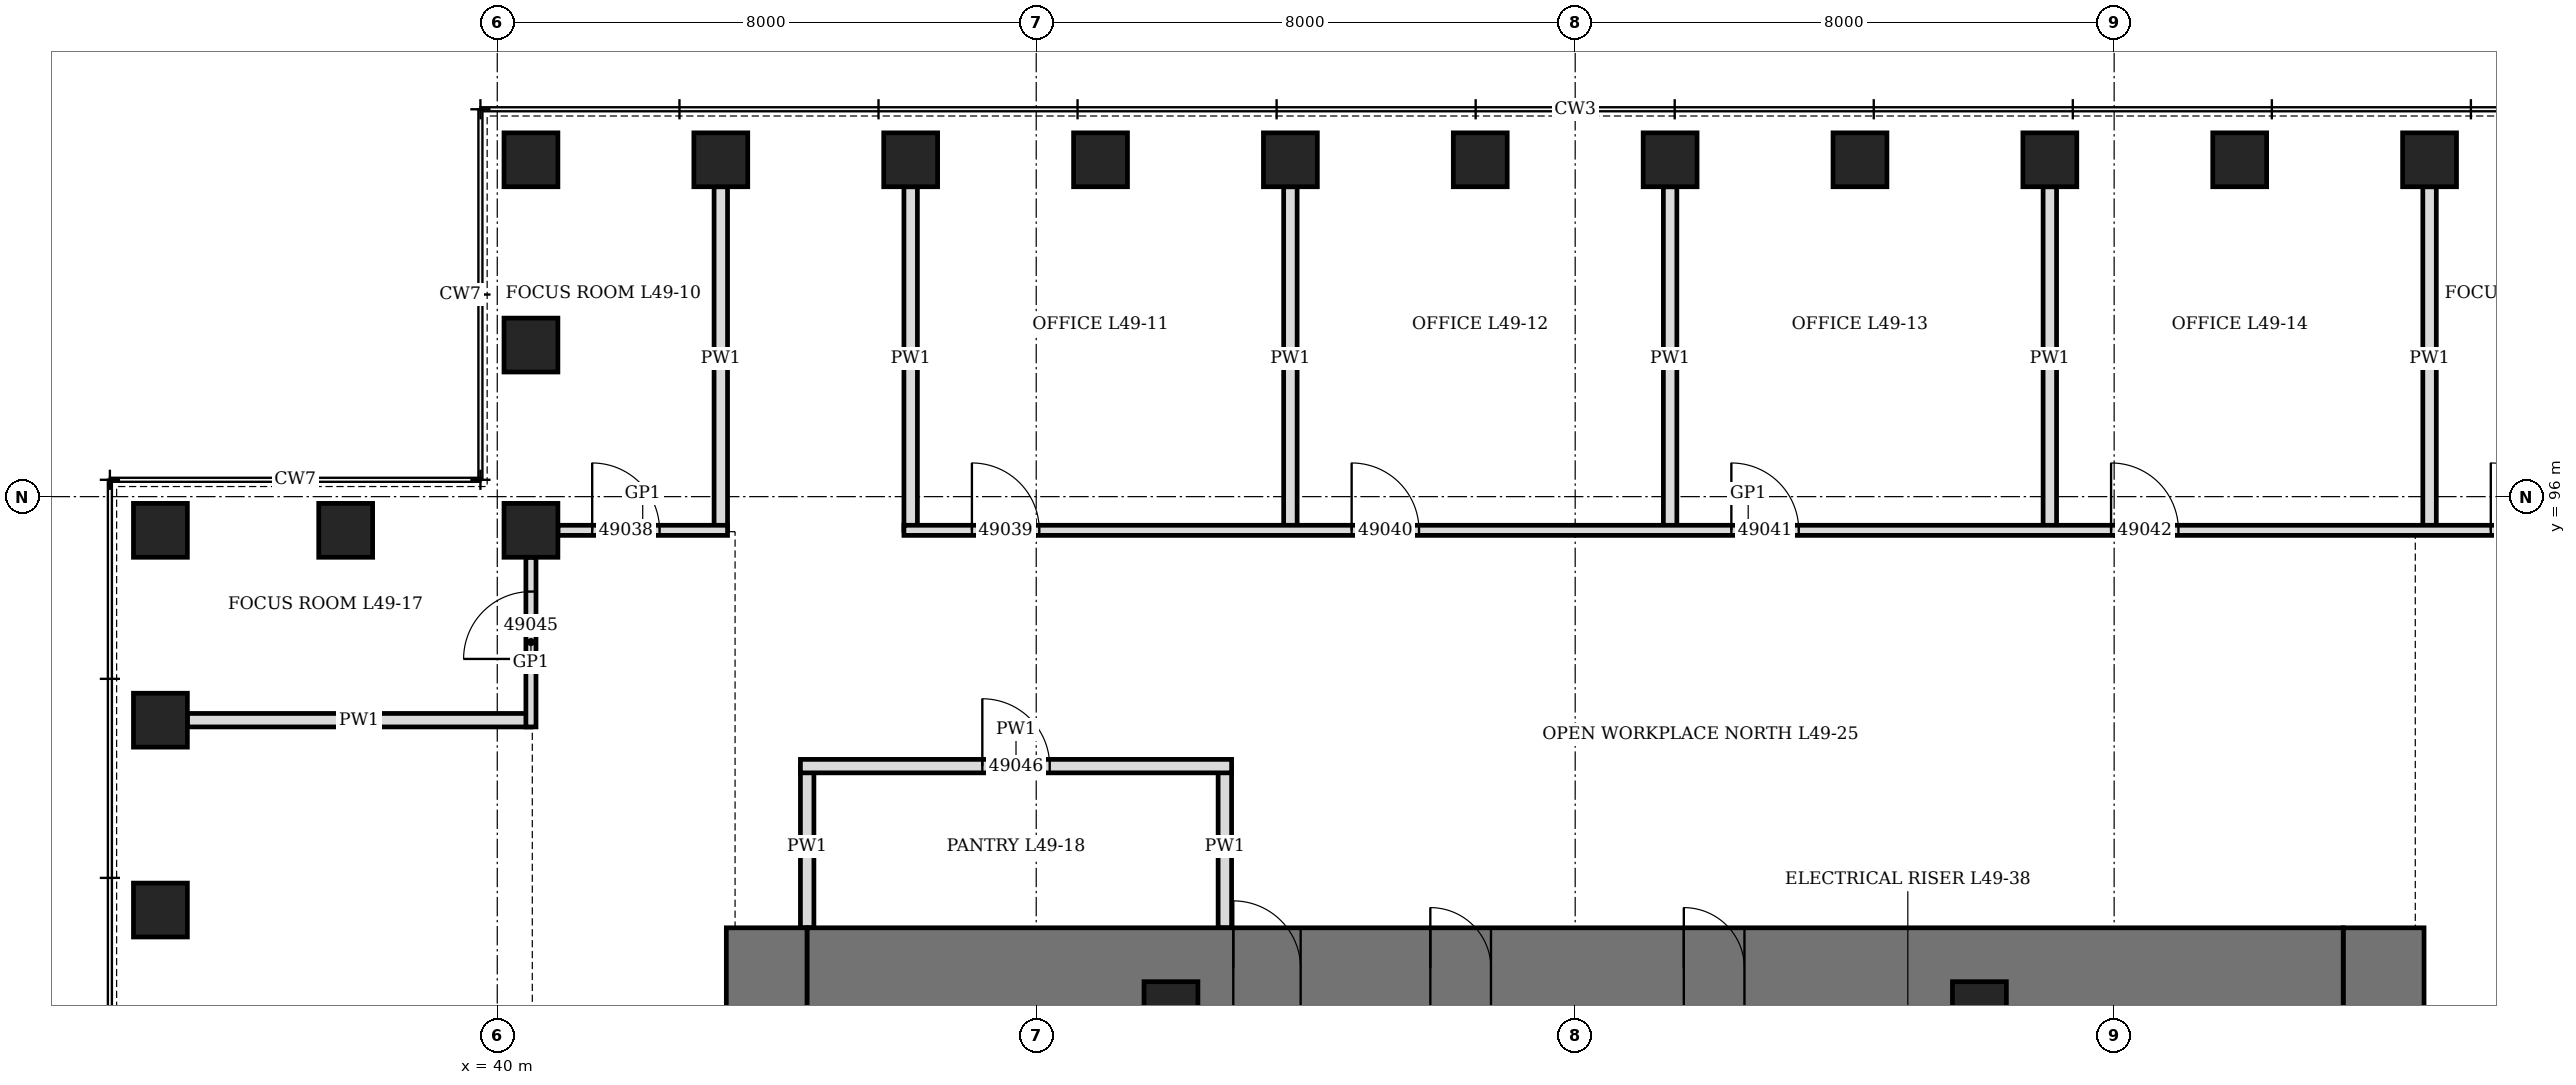
"""IFC4 building model, lengths in metres.
Left out: names, types, materials, properties, quantities, classifications, styles, units other than length and angle.
Written with IfcOpenShell. Run it as: python <this file> out.ifc"""

import sys

from ifc_helpers import new_model, si_unit, direction, frame, frame_2d, origin, origin_2d, place, context, subcontext, project, spatial, rectangle, hollow_rectangle, extrude, element, fill, save


model = new_model("IFC4")
c1 = context("Model", 3, precision=1e-05, world=origin(), true_north=direction((0.0, 1.0)))
c2 = subcontext(c1, "Body", "Model", "MODEL_VIEW")
j1 = project(units=[si_unit("LENGTHUNIT", "METRE"), si_unit("PLANEANGLEUNIT", "RADIAN")], contexts=[c1])
p1 = place(None, origin())
s1 = spatial("IfcSite", under=j1, at=p1, CompositionType="ELEMENT")
p2 = place(p1, origin())
s2 = spatial("IfcBuilding", under=s1, at=p2, CompositionType="ELEMENT")
p3 = place(p2, frame((0.0, 0.0, 219.1)))
s3 = spatial("IfcBuildingStorey", under=s2, at=p3, CompositionType="ELEMENT", Elevation=219.1)
for number, where, z_axis, x_axis in (
    (1, (68.682, 101.0, 0.0), (0.0, 0.0, 1.0), (1.0, 0.0, 0.0)),
    (2, (65.864, 101.0, 0.0), (0.0, 0.0, 1.0), (1.0, 0.0, 0.0)),
    (3, (63.045, 101.0, 0.0), (0.0, 0.0, 1.0), (1.0, 0.0, 0.0)),
    (4, (60.227, 101.0, 0.0), (0.0, 0.0, 1.0), (1.0, 0.0, 0.0)),
    (5, (57.409, 101.0, 0.0), (0.0, 0.0, 1.0), (1.0, 0.0, 0.0)),
    (6, (54.591, 101.0, 0.0), (0.0, 0.0, 1.0), (1.0, 0.0, 0.0)),
    (7, (51.773, 101.0, 0.0), (0.0, 0.0, 1.0), (1.0, 0.0, 0.0)),
    (8, (48.955, 101.0, 0.0), (0.0, 0.0, 1.0), (1.0, 0.0, 0.0)),
    (9, (46.136, 101.0, 0.0), (0.0, 0.0, 1.0), (1.0, 0.0, 0.0)),
    (10, (43.318, 101.0, 0.0), (0.0, 0.0, 1.0), (1.0, 0.0, 0.0)),
    (11, (40.5, 101.0, 0.0), (0.0, 0.0, 1.0), (0.0, 1.0, 0.0)),
    (12, (40.5, 98.25, 0.0), (0.0, 0.0, 1.0), (0.0, 1.0, 0.0)),
    (13, (40.5, 95.5, 0.0), (0.0, 0.0, 1.0), (1.0, 0.0, 0.0)),
    (14, (37.75, 95.5, 0.0), (0.0, 0.0, 1.0), (1.0, 0.0, 0.0)),
    (15, (35.0, 95.5, 0.0), (0.0, 0.0, 1.0), (0.0, 1.0, 0.0)),
    (16, (35.0, 92.682, 0.0), (0.0, 0.0, 1.0), (0.0, 1.0, 0.0)),
    (17, (35.0, 89.864, 0.0), (0.0, 0.0, 1.0), (0.0, 1.0, 0.0)),
):
    element("IfcColumn", number, at=place(p3, frame(where, z_axis=z_axis, x_axis=x_axis)), inside=s3, PredefinedType="COLUMN", context=c2, shape_type="SweptSolid", body=[
        extrude(hollow_rectangle(XDim=0.8, YDim=0.8, WallThickness=0.08, at=origin_2d()), origin(), (0.0, 0.0, 1.0), 4.2),
    ])
p4 = place(p3, frame((44.0, 70.4, 0.0), z_axis=(0.0, 0.0, 1.0), x_axis=(0.0, 1.0, 0.0)))
e18 = element("IfcWall", 18, at=p4, inside=s3, PredefinedType="SHEAR", context=c2, shape_type="SweptSolid", body=[
    extrude(rectangle(XDim=19.2, YDim=1.2, at=frame_2d((9.6, 0.0))), origin(), (0.0, 0.0, 1.0), 4.2),
])
p5 = place(p4, frame((8.6, 0.0, 0.0)))
e19 = element("IfcOpeningElement", 19, at=p5, cuts=e18, PredefinedType="OPENING", context=c2, shape_type="SweptSolid", body=[
    extrude(rectangle(XDim=2.0, YDim=2.4, at=frame_2d((1.0, 1.2))), frame((0.0, 0.61, 0.0), z_axis=(0.0, -1.0, 0.0), x_axis=(1.0, 0.0, 0.0)), (0.0, 0.0, 1.0), 1.22),
])
p6 = place(p3, frame((68.0, 70.4, 0.0), z_axis=(0.0, 0.0, 1.0), x_axis=(0.0, 1.0, 0.0)))
e20 = element("IfcWall", 20, at=p6, inside=s3, PredefinedType="SHEAR", context=c2, shape_type="SweptSolid", body=[
    extrude(rectangle(XDim=19.2, YDim=1.2, at=frame_2d((9.6, 0.0))), origin(), (0.0, 0.0, 1.0), 4.2),
])
p7 = place(p6, frame((8.6, 0.0, 0.0)))
e21 = element("IfcOpeningElement", 21, at=p7, cuts=e20, PredefinedType="OPENING", context=c2, shape_type="SweptSolid", body=[
    extrude(rectangle(XDim=2.0, YDim=2.4, at=frame_2d((1.0, 1.2))), frame((0.0, 0.61, 0.0), z_axis=(0.0, -1.0, 0.0), x_axis=(1.0, 0.0, 0.0)), (0.0, 0.0, 1.0), 1.22),
])
p8 = place(p3, frame((44.6, 89.0, 0.0), z_axis=(0.0, 0.0, 1.0), x_axis=(1.0, 0.0, 0.0)))
e22 = element("IfcWall", 22, at=p8, inside=s3, PredefinedType="SHEAR", context=c2, shape_type="SweptSolid", body=[
    extrude(rectangle(XDim=22.8, YDim=1.2, at=frame_2d((11.4, 0.0))), origin(), (0.0, 0.0, 1.0), 4.2),
])
p9 = place(p8, frame((6.325, 0.0, 0.0)))
e23 = element("IfcOpeningElement", 23, at=p9, cuts=e22, PredefinedType="OPENING", context=c2, shape_type="SweptSolid", body=[
    extrude(rectangle(XDim=1.0, YDim=2.1, at=frame_2d((0.5, 1.05))), frame((0.0, 0.61, 0.0), z_axis=(0.0, -1.0, 0.0), x_axis=(1.0, 0.0, 0.0)), (0.0, 0.0, 1.0), 1.22),
])
p10 = place(p8, frame((9.25, 0.0, 0.0)))
e24 = element("IfcOpeningElement", 24, at=p10, cuts=e22, PredefinedType="OPENING", context=c2, shape_type="SweptSolid", body=[
    extrude(rectangle(XDim=0.9, YDim=2.1, at=frame_2d((0.45, 1.05))), frame((0.0, 0.61, 0.0), z_axis=(0.0, -1.0, 0.0), x_axis=(1.0, 0.0, 0.0)), (0.0, 0.0, 1.0), 1.22),
])
p11 = place(p8, frame((13.012, 0.0, 0.0)))
e25 = element("IfcOpeningElement", 25, at=p11, cuts=e22, PredefinedType="OPENING", context=c2, shape_type="SweptSolid", body=[
    extrude(rectangle(XDim=0.9, YDim=2.1, at=frame_2d((0.45, 1.05))), frame((0.0, 0.61, 0.0), z_axis=(0.0, -1.0, 0.0), x_axis=(1.0, 0.0, 0.0)), (0.0, 0.0, 1.0), 1.22),
])
for number, where, z_axis, x_axis in (
    (26, (50.0, 88.4, 0.0), (0.0, 0.0, 1.0), (1.0, 0.0, 0.0)),
    (27, (62.0, 88.4, 0.0), (0.0, 0.0, 1.0), (1.0, 0.0, 0.0)),
):
    element("IfcColumn", number, at=place(p3, frame(where, z_axis=z_axis, x_axis=x_axis)), inside=s3, PredefinedType="COLUMN", context=c2, shape_type="SweptSolid", body=[
        extrude(hollow_rectangle(XDim=0.8, YDim=0.8, WallThickness=0.1, at=origin_2d()), origin(), (0.0, 0.0, 1.0), 4.2),
    ])
for number, where, z_axis, x_axis in (
    (28, (43.318, 95.5, 0.0), (0.0, 0.0, 1.0), (0.0, 1.0, 0.0)),
    (29, (46.136, 95.5, 0.0), (0.0, 0.0, 1.0), (0.0, 1.0, 0.0)),
    (30, (51.773, 95.5, 0.0), (0.0, 0.0, 1.0), (0.0, 1.0, 0.0)),
    (31, (57.409, 95.5, 0.0), (0.0, 0.0, 1.0), (0.0, 1.0, 0.0)),
    (32, (63.045, 95.5, 0.0), (0.0, 0.0, 1.0), (0.0, 1.0, 0.0)),
    (33, (68.682, 95.5, 0.0), (0.0, 0.0, 1.0), (0.0, 1.0, 0.0)),
    (34, (35.4, 92.682, 0.0), (0.0, 0.0, 1.0), (1.0, 0.0, 0.0)),
):
    element("IfcWall", number, at=place(p3, frame(where, z_axis=z_axis, x_axis=x_axis)), inside=s3, PredefinedType="PARTITIONING", context=c2, shape_type="SweptSolid", body=[
        extrude(rectangle(XDim=5.1, YDim=0.2, at=frame_2d((2.55, 0.0))), origin(), (0.0, 0.0, 1.0), 3.428),
    ])
for number, where, z_axis, x_axis in (
    (35, (44.6, 89.6, 0.0), (0.0, 0.0, 1.0), (0.0, 1.0, 0.0)),
    (36, (50.8, 89.6, 0.0), (0.0, 0.0, 1.0), (0.0, 1.0, 0.0)),
):
    element("IfcWall", number, at=place(p3, frame(where, z_axis=z_axis, x_axis=x_axis)), inside=s3, PredefinedType="PARTITIONING", context=c2, shape_type="SweptSolid", body=[
        extrude(rectangle(XDim=2.4, YDim=0.2, at=frame_2d((1.2, 0.0))), origin(), (0.0, 0.0, 1.0), 4.04),
    ])
p12 = place(p3, frame((44.5, 92.0, 0.0), z_axis=(0.0, 0.0, 1.0), x_axis=(1.0, 0.0, 0.0)))
e37 = element("IfcWall", 37, at=p12, inside=s3, PredefinedType="PARTITIONING", context=c2, shape_type="SweptSolid", body=[
    extrude(rectangle(XDim=6.4, YDim=0.2, at=frame_2d((3.2, 0.0))), origin(), (0.0, 0.0, 1.0), 4.04),
])
p13 = place(p12, frame((2.7, 0.0, 0.0)))
e38 = element("IfcOpeningElement", 38, at=p13, cuts=e37, PredefinedType="OPENING", context=c2, shape_type="SweptSolid", body=[
    extrude(rectangle(XDim=1.0, YDim=2.1, at=frame_2d((0.5, 1.05))), frame((0.0, 0.11, 0.0), z_axis=(0.0, -1.0, 0.0), x_axis=(1.0, 0.0, 0.0)), (0.0, 0.0, 1.0), 0.22),
])
p14 = place(p3, frame((40.9, 95.5, 0.0), z_axis=(0.0, 0.0, 1.0), x_axis=(1.0, 0.0, 0.0)))
e39 = element("IfcWall", 39, at=p14, inside=s3, PredefinedType="PARTITIONING", context=c2, shape_type="SweptSolid", body=[
    extrude(rectangle(XDim=2.518, YDim=0.15, at=frame_2d((1.259, 0.0))), origin(), (0.0, 0.0, 1.0), 4.04),
])
p15 = place(p14, frame((0.509, 0.0, 0.0)))
e40 = element("IfcOpeningElement", 40, at=p15, cuts=e39, PredefinedType="OPENING", context=c2, shape_type="SweptSolid", body=[
    extrude(rectangle(XDim=1.0, YDim=2.4, at=frame_2d((0.5, 1.2))), frame((0.0, 0.085, 0.0), z_axis=(0.0, -1.0, 0.0), x_axis=(1.0, 0.0, 0.0)), (0.0, 0.0, 1.0), 0.17),
])
p16 = place(p3, frame((46.036, 95.5, 0.0), z_axis=(0.0, 0.0, 1.0), x_axis=(1.0, 0.0, 0.0)))
e41 = element("IfcWall", 41, at=p16, inside=s3, PredefinedType="PARTITIONING", context=c2, shape_type="SweptSolid", body=[
    extrude(rectangle(XDim=25.064, YDim=0.15, at=frame_2d((12.532, 0.0))), origin(), (0.0, 0.0, 1.0), 4.04),
])
p17 = place(p16, frame((1.009, 0.0, 0.0)))
e42 = element("IfcOpeningElement", 42, at=p17, cuts=e41, PredefinedType="OPENING", context=c2, shape_type="SweptSolid", body=[
    extrude(rectangle(XDim=1.0, YDim=2.1, at=frame_2d((0.5, 1.05))), frame((0.0, 0.085, 0.0), z_axis=(0.0, -1.0, 0.0), x_axis=(1.0, 0.0, 0.0)), (0.0, 0.0, 1.0), 0.17),
])
p18 = place(p16, frame((6.646, 0.0, 0.0)))
e43 = element("IfcOpeningElement", 43, at=p18, cuts=e41, PredefinedType="OPENING", context=c2, shape_type="SweptSolid", body=[
    extrude(rectangle(XDim=1.0, YDim=2.1, at=frame_2d((0.5, 1.05))), frame((0.0, 0.085, 0.0), z_axis=(0.0, -1.0, 0.0), x_axis=(1.0, 0.0, 0.0)), (0.0, 0.0, 1.0), 0.17),
])
p19 = place(p16, frame((12.282, 0.0, 0.0)))
e44 = element("IfcOpeningElement", 44, at=p19, cuts=e41, PredefinedType="OPENING", context=c2, shape_type="SweptSolid", body=[
    extrude(rectangle(XDim=1.0, YDim=2.1, at=frame_2d((0.5, 1.05))), frame((0.0, 0.085, 0.0), z_axis=(0.0, -1.0, 0.0), x_axis=(1.0, 0.0, 0.0)), (0.0, 0.0, 1.0), 0.17),
])
p20 = place(p16, frame((17.918, 0.0, 0.0)))
e45 = element("IfcOpeningElement", 45, at=p20, cuts=e41, PredefinedType="OPENING", context=c2, shape_type="SweptSolid", body=[
    extrude(rectangle(XDim=1.0, YDim=2.1, at=frame_2d((0.5, 1.05))), frame((0.0, 0.085, 0.0), z_axis=(0.0, -1.0, 0.0), x_axis=(1.0, 0.0, 0.0)), (0.0, 0.0, 1.0), 0.17),
])
p21 = place(p16, frame((23.554, 0.0, 0.0)))
e46 = element("IfcOpeningElement", 46, at=p21, cuts=e41, PredefinedType="OPENING", context=c2, shape_type="SweptSolid", body=[
    extrude(rectangle(XDim=1.0, YDim=2.4, at=frame_2d((0.5, 1.2))), frame((0.0, 0.085, 0.0), z_axis=(0.0, -1.0, 0.0), x_axis=(1.0, 0.0, 0.0)), (0.0, 0.0, 1.0), 0.17),
])
p22 = place(p3, frame((40.5, 92.582, 0.0), z_axis=(0.0, 0.0, 1.0), x_axis=(0.0, 1.0, 0.0)))
e47 = element("IfcWall", 47, at=p22, inside=s3, PredefinedType="PARTITIONING", context=c2, shape_type="SweptSolid", body=[
    extrude(rectangle(XDim=2.518, YDim=0.15, at=frame_2d((1.259, 0.0))), origin(), (0.0, 0.0, 1.0), 4.04),
])
p23 = place(p22, frame((1.009, 0.0, 0.0)))
e48 = element("IfcOpeningElement", 48, at=p23, cuts=e47, PredefinedType="OPENING", context=c2, shape_type="SweptSolid", body=[
    extrude(rectangle(XDim=1.0, YDim=2.4, at=frame_2d((0.5, 1.2))), frame((0.0, 0.085, 0.0), z_axis=(0.0, -1.0, 0.0), x_axis=(1.0, 0.0, 0.0)), (0.0, 0.0, 1.0), 0.17),
])
p24 = place(p9, origin())
e49 = element("IfcDoor", 49, at=p24, inside=s3, OperationType="SINGLE_SWING_LEFT", PredefinedType="DOOR", context=c2, shape_type="SweptSolid", body=[
    extrude(rectangle(XDim=1.0, YDim=2.1, at=frame_2d((0.5, 1.05))), frame((0.0, 0.35, 0.0), z_axis=(0.0, -1.0, 0.0), x_axis=(1.0, 0.0, 0.0)), (0.0, 0.0, 1.0), 0.7),
])
fill(e23, e49)
p25 = place(p10, origin())
e50 = element("IfcDoor", 50, at=p25, inside=s3, OperationType="SINGLE_SWING_LEFT", PredefinedType="DOOR", context=c2, shape_type="SweptSolid", body=[
    extrude(rectangle(XDim=0.9, YDim=2.1, at=frame_2d((0.45, 1.05))), frame((0.0, 0.35, 0.0), z_axis=(0.0, -1.0, 0.0), x_axis=(1.0, 0.0, 0.0)), (0.0, 0.0, 1.0), 0.7),
])
fill(e24, e50)
p26 = place(p11, origin())
e51 = element("IfcDoor", 51, at=p26, inside=s3, OperationType="SINGLE_SWING_LEFT", PredefinedType="DOOR", context=c2, shape_type="SweptSolid", body=[
    extrude(rectangle(XDim=0.9, YDim=2.1, at=frame_2d((0.45, 1.05))), frame((0.0, 0.35, 0.0), z_axis=(0.0, -1.0, 0.0), x_axis=(1.0, 0.0, 0.0)), (0.0, 0.0, 1.0), 0.7),
])
fill(e25, e51)
p27 = place(p15, origin())
e52 = element("IfcDoor", 52, at=p27, inside=s3, OperationType="SINGLE_SWING_RIGHT", PredefinedType="DOOR", context=c2, shape_type="SweptSolid", body=[
    extrude(rectangle(XDim=1.0, YDim=2.4, at=frame_2d((0.5, 1.2))), frame((0.0, 0.075, 0.0), z_axis=(0.0, -1.0, 0.0), x_axis=(1.0, 0.0, 0.0)), (0.0, 0.0, 1.0), 0.149),
])
fill(e40, e52)
p28 = place(p17, origin())
e53 = element("IfcDoor", 53, at=p28, inside=s3, OperationType="SINGLE_SWING_LEFT", PredefinedType="DOOR", context=c2, shape_type="SweptSolid", body=[
    extrude(rectangle(XDim=1.0, YDim=2.1, at=frame_2d((0.5, 1.05))), frame((0.0, 0.075, 0.0), z_axis=(0.0, -1.0, 0.0), x_axis=(1.0, 0.0, 0.0)), (0.0, 0.0, 1.0), 0.149),
])
fill(e42, e53)
p29 = place(p18, origin())
e54 = element("IfcDoor", 54, at=p29, inside=s3, OperationType="SINGLE_SWING_LEFT", PredefinedType="DOOR", context=c2, shape_type="SweptSolid", body=[
    extrude(rectangle(XDim=1.0, YDim=2.1, at=frame_2d((0.5, 1.05))), frame((0.0, 0.075, 0.0), z_axis=(0.0, -1.0, 0.0), x_axis=(1.0, 0.0, 0.0)), (0.0, 0.0, 1.0), 0.149),
])
fill(e43, e54)
p30 = place(p19, origin())
e55 = element("IfcDoor", 55, at=p30, inside=s3, OperationType="SINGLE_SWING_LEFT", PredefinedType="DOOR", context=c2, shape_type="SweptSolid", body=[
    extrude(rectangle(XDim=1.0, YDim=2.1, at=frame_2d((0.5, 1.05))), frame((0.0, 0.075, 0.0), z_axis=(0.0, -1.0, 0.0), x_axis=(1.0, 0.0, 0.0)), (0.0, 0.0, 1.0), 0.149),
])
fill(e44, e55)
p31 = place(p20, origin())
e56 = element("IfcDoor", 56, at=p31, inside=s3, OperationType="SINGLE_SWING_LEFT", PredefinedType="DOOR", context=c2, shape_type="SweptSolid", body=[
    extrude(rectangle(XDim=1.0, YDim=2.1, at=frame_2d((0.5, 1.05))), frame((0.0, 0.075, 0.0), z_axis=(0.0, -1.0, 0.0), x_axis=(1.0, 0.0, 0.0)), (0.0, 0.0, 1.0), 0.149),
])
fill(e45, e56)
p32 = place(p21, origin())
e57 = element("IfcDoor", 57, at=p32, inside=s3, OperationType="SINGLE_SWING_RIGHT", PredefinedType="DOOR", context=c2, shape_type="SweptSolid", body=[
    extrude(rectangle(XDim=1.0, YDim=2.4, at=frame_2d((0.5, 1.2))), frame((0.0, 0.075, 0.0), z_axis=(0.0, -1.0, 0.0), x_axis=(1.0, 0.0, 0.0)), (0.0, 0.0, 1.0), 0.149),
])
fill(e46, e57)
p33 = place(p23, origin())
e58 = element("IfcDoor", 58, at=p33, inside=s3, OperationType="SINGLE_SWING_RIGHT", PredefinedType="DOOR", context=c2, shape_type="SweptSolid", body=[
    extrude(rectangle(XDim=1.0, YDim=2.4, at=frame_2d((0.5, 1.2))), frame((0.0, 0.075, 0.0), z_axis=(0.0, -1.0, 0.0), x_axis=(1.0, 0.0, 0.0)), (0.0, 0.0, 1.0), 0.149),
])
fill(e48, e58)
p34 = place(p13, origin())
e59 = element("IfcDoor", 59, at=p34, inside=s3, OperationType="SINGLE_SWING_LEFT", PredefinedType="DOOR", context=c2, shape_type="SweptSolid", body=[
    extrude(rectangle(XDim=1.0, YDim=2.1, at=frame_2d((0.5, 1.05))), frame((0.0, 0.1, 0.0), z_axis=(0.0, -1.0, 0.0), x_axis=(1.0, 0.0, 0.0)), (0.0, 0.0, 1.0), 0.199),
])
fill(e38, e59)
save(model, sys.argv[1])
